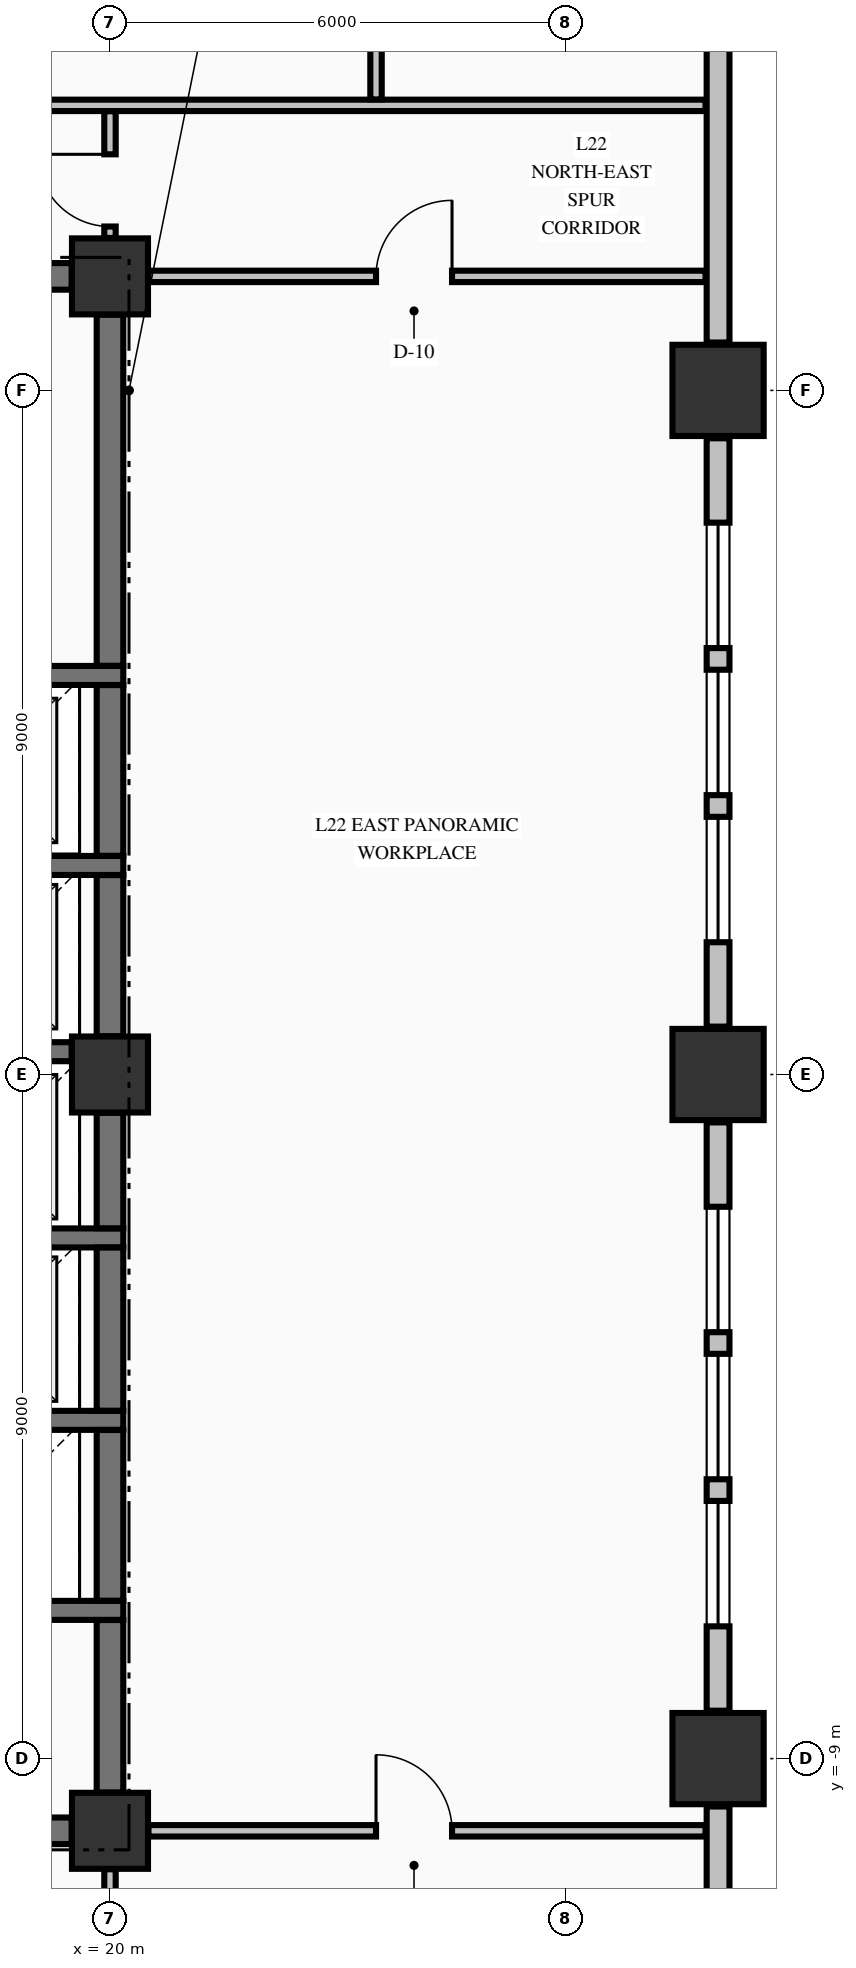
"""IFC4 building model, lengths in metres.
Left out: names, types, materials, properties, quantities, classifications, styles, units other than length and angle.
Written with IfcOpenShell. Run it as: python <this file> out.ifc"""

import sys

from ifc_helpers import new_model, si_unit, direction, frame, frame_2d, origin, origin_2d, place, context, subcontext, project, spatial, rectangle, extrude, element, fill, save


model = new_model("IFC4")
c1 = context("Model", 3, precision=1e-05, world=origin(), true_north=direction((0.0, 1.0)))
c2 = subcontext(c1, "Body", "Model", "MODEL_VIEW")
j1 = project(units=[si_unit("LENGTHUNIT", "METRE"), si_unit("PLANEANGLEUNIT", "RADIAN")], contexts=[c1])
p1 = place(None, origin())
s1 = spatial("IfcSite", under=j1, at=p1, CompositionType="ELEMENT")
p2 = place(p1, origin())
s2 = spatial("IfcBuilding", under=s1, at=p2, CompositionType="ELEMENT")
p3 = place(p2, frame((0.0, 0.0, 91.36)))
s3 = spatial("IfcBuildingStorey", under=s2, at=p3, CompositionType="ELEMENT", Elevation=91.36)
for number, where, z_axis, x_axis in (
    (1, (28.0, -9.0, -0.25), (0.0, 0.0, 1.0), (1.0, 0.0, 0.0)),
    (2, (28.0, 0.0, -0.25), (0.0, 0.0, 1.0), (1.0, 0.0, 0.0)),
    (3, (28.0, 9.0, -0.25), (0.0, 0.0, 1.0), (1.0, 0.0, 0.0)),
):
    element("IfcColumn", number, at=place(p3, frame(where, z_axis=z_axis, x_axis=x_axis)), inside=s3, PredefinedType="COLUMN", context=c2, shape_type="SweptSolid", body=[
        extrude(rectangle(XDim=1.2, YDim=1.2, at=origin_2d()), origin(), (0.0, 0.0, 1.0), 3.57),
    ])
for number, where, z_axis, x_axis in (
    (4, (20.0, -9.95, -0.25), (0.0, 0.0, 1.0), (1.0, 0.0, 0.0)),
    (5, (20.0, 10.5, -0.25), (0.0, 0.0, 1.0), (1.0, 0.0, 0.0)),
    (6, (20.0, 0.0, -0.25), (0.0, 0.0, 1.0), (1.0, 0.0, 0.0)),
):
    element("IfcColumn", number, at=place(p3, frame(where, z_axis=z_axis, x_axis=x_axis)), inside=s3, PredefinedType="COLUMN", context=c2, shape_type="SweptSolid", body=[
        extrude(rectangle(XDim=1.0, YDim=1.0, at=origin_2d()), origin(), (0.0, 0.0, 1.0), 3.57),
    ])
p4 = place(p3, frame((28.0, -20.37, 0.0), z_axis=(0.0, 0.0, 1.0), x_axis=(0.0, 1.0, 0.0)))
e7 = element("IfcWall", 7, at=p4, inside=s3, PredefinedType="STANDARD", context=c2, shape_type="SweptSolid", body=[
    extrude(rectangle(XDim=10.74, YDim=0.3, at=frame_2d((5.37, 0.0))), origin(), (0.0, 0.0, 1.0), 2.712),
])
p5 = place(p3, frame((28.0, -8.37, 0.0), z_axis=(0.0, 0.0, 1.0), x_axis=(0.0, 1.0, 0.0)))
e8 = element("IfcWall", 8, at=p5, inside=s3, PredefinedType="STANDARD", context=c2, shape_type="SweptSolid", body=[
    extrude(rectangle(XDim=7.74, YDim=0.3, at=frame_2d((3.87, 0.0))), origin(), (0.0, 0.0, 1.0), 2.712),
])
p6 = place(p5, frame((1.11, 0.0, 0.8)))
e9 = element("IfcOpeningElement", 9, at=p6, cuts=e8, PredefinedType="OPENING", context=c2, shape_type="SweptSolid", body=[
    extrude(rectangle(XDim=1.65, YDim=1.7, at=frame_2d((0.825, 0.85))), frame((0.0, 0.16, 0.0), z_axis=(0.0, -1.0, 0.0), x_axis=(1.0, 0.0, 0.0)), (0.0, 0.0, 1.0), 0.32),
])
p7 = place(p5, frame((3.045, 0.0, 0.8)))
e10 = element("IfcOpeningElement", 10, at=p7, cuts=e8, PredefinedType="OPENING", context=c2, shape_type="SweptSolid", body=[
    extrude(rectangle(XDim=1.65, YDim=1.7, at=frame_2d((0.825, 0.85))), frame((0.0, 0.16, 0.0), z_axis=(0.0, -1.0, 0.0), x_axis=(1.0, 0.0, 0.0)), (0.0, 0.0, 1.0), 0.32),
])
p8 = place(p5, frame((4.98, 0.0, 0.8)))
e11 = element("IfcOpeningElement", 11, at=p8, cuts=e8, PredefinedType="OPENING", context=c2, shape_type="SweptSolid", body=[
    extrude(rectangle(XDim=1.65, YDim=1.7, at=frame_2d((0.825, 0.85))), frame((0.0, 0.16, 0.0), z_axis=(0.0, -1.0, 0.0), x_axis=(1.0, 0.0, 0.0)), (0.0, 0.0, 1.0), 0.32),
])
p9 = place(p3, frame((28.0, 0.63, 0.0), z_axis=(0.0, 0.0, 1.0), x_axis=(0.0, 1.0, 0.0)))
e12 = element("IfcWall", 12, at=p9, inside=s3, PredefinedType="STANDARD", context=c2, shape_type="SweptSolid", body=[
    extrude(rectangle(XDim=7.74, YDim=0.3, at=frame_2d((3.87, 0.0))), origin(), (0.0, 0.0, 1.0), 2.712),
])
p10 = place(p9, frame((1.11, 0.0, 0.8)))
e13 = element("IfcOpeningElement", 13, at=p10, cuts=e12, PredefinedType="OPENING", context=c2, shape_type="SweptSolid", body=[
    extrude(rectangle(XDim=1.65, YDim=1.7, at=frame_2d((0.825, 0.85))), frame((0.0, 0.16, 0.0), z_axis=(0.0, -1.0, 0.0), x_axis=(1.0, 0.0, 0.0)), (0.0, 0.0, 1.0), 0.32),
])
p11 = place(p9, frame((3.045, 0.0, 0.8)))
e14 = element("IfcOpeningElement", 14, at=p11, cuts=e12, PredefinedType="OPENING", context=c2, shape_type="SweptSolid", body=[
    extrude(rectangle(XDim=1.65, YDim=1.7, at=frame_2d((0.825, 0.85))), frame((0.0, 0.16, 0.0), z_axis=(0.0, -1.0, 0.0), x_axis=(1.0, 0.0, 0.0)), (0.0, 0.0, 1.0), 0.32),
])
p12 = place(p9, frame((4.98, 0.0, 0.8)))
e15 = element("IfcOpeningElement", 15, at=p12, cuts=e12, PredefinedType="OPENING", context=c2, shape_type="SweptSolid", body=[
    extrude(rectangle(XDim=1.65, YDim=1.7, at=frame_2d((0.825, 0.85))), frame((0.0, 0.16, 0.0), z_axis=(0.0, -1.0, 0.0), x_axis=(1.0, 0.0, 0.0)), (0.0, 0.0, 1.0), 0.32),
])
p13 = place(p3, frame((28.0, 9.63, 0.0), z_axis=(0.0, 0.0, 1.0), x_axis=(0.0, 1.0, 0.0)))
e16 = element("IfcWall", 16, at=p13, inside=s3, PredefinedType="STANDARD", context=c2, shape_type="SweptSolid", body=[
    extrude(rectangle(XDim=10.74, YDim=0.3, at=frame_2d((5.37, 0.0))), origin(), (0.0, 0.0, 1.0), 2.712),
])
p14 = place(p3, frame((14.7, -9.95, 0.0), z_axis=(0.0, 0.0, 1.0), x_axis=(1.0, 0.0, 0.0)))
e17 = element("IfcWall", 17, at=p14, inside=s3, PredefinedType="SHEAR", context=c2, shape_type="SweptSolid", body=[
    extrude(rectangle(XDim=4.796, YDim=0.35, at=frame_2d((2.398, 0.0))), origin(), (0.0, 0.0, 1.0), 3.32),
])
p15 = place(p14, frame((0.65, 0.0, 0.0)))
e18 = element("IfcOpeningElement", 18, at=p15, cuts=e17, PredefinedType="OPENING", context=c2, shape_type="SweptSolid", body=[
    extrude(rectangle(XDim=1.2, YDim=2.15, at=frame_2d((0.6, 1.075))), frame((0.0, 0.185, 0.0), z_axis=(0.0, -1.0, 0.0), x_axis=(1.0, 0.0, 0.0)), (0.0, 0.0, 1.0), 0.37),
])
for number, where, z_axis, x_axis in (
    (19, (17.025, -7.05, 0.0), (0.0, 0.0, 1.0), (1.0, 0.0, 0.0)),
    (20, (17.025, -4.55, 0.0), (0.0, 0.0, 1.0), (1.0, 0.0, 0.0)),
    (21, (17.025, -2.15, 0.0), (0.0, 0.0, 1.0), (1.0, 0.0, 0.0)),
):
    element("IfcWall", number, at=place(p3, frame(where, z_axis=z_axis, x_axis=x_axis)), inside=s3, PredefinedType="SOLIDWALL", context=c2, shape_type="SweptSolid", body=[
        extrude(rectangle(XDim=3.15, YDim=0.25, at=frame_2d((1.575, 0.0))), origin(), (0.0, 0.0, 1.0), 3.32),
    ])
p16 = place(p3, frame((17.025, 0.3, 0.0), z_axis=(0.0, 0.0, 1.0), x_axis=(1.0, 0.0, 0.0)))
e22 = element("IfcWall", 22, at=p16, inside=s3, PredefinedType="SOLIDWALL", context=c2, shape_type="SweptSolid", body=[
    extrude(rectangle(XDim=2.471, YDim=0.25, at=frame_2d((1.236, 0.0))), origin(), (0.0, 0.0, 1.0), 3.32),
])
for number, where, z_axis, x_axis in (
    (23, (17.025, 2.75, 0.0), (0.0, 0.0, 1.0), (1.0, 0.0, 0.0)),
    (24, (17.025, 5.25, 0.0), (0.0, 0.0, 1.0), (1.0, 0.0, 0.0)),
):
    element("IfcWall", number, at=place(p3, frame(where, z_axis=z_axis, x_axis=x_axis)), inside=s3, PredefinedType="SOLIDWALL", context=c2, shape_type="SweptSolid", body=[
        extrude(rectangle(XDim=3.15, YDim=0.25, at=frame_2d((1.575, 0.0))), origin(), (0.0, 0.0, 1.0), 3.32),
    ])
p17 = place(p3, frame((14.7, 10.5, 0.0), z_axis=(0.0, 0.0, 1.0), x_axis=(1.0, 0.0, 0.0)))
e25 = element("IfcWall", 25, at=p17, inside=s3, PredefinedType="SHEAR", context=c2, shape_type="SweptSolid", body=[
    extrude(rectangle(XDim=4.796, YDim=0.35, at=frame_2d((2.398, 0.0))), origin(), (0.0, 0.0, 1.0), 3.32),
])
p18 = place(p17, frame((0.65, 0.0, 0.0)))
e26 = element("IfcOpeningElement", 26, at=p18, cuts=e25, PredefinedType="OPENING", context=c2, shape_type="SweptSolid", body=[
    extrude(rectangle(XDim=1.2, YDim=2.15, at=frame_2d((0.6, 1.075))), frame((0.0, 0.185, 0.0), z_axis=(0.0, -1.0, 0.0), x_axis=(1.0, 0.0, 0.0)), (0.0, 0.0, 1.0), 0.37),
])
p19 = place(p17, frame((3.25, 0.0, 0.0)))
e27 = element("IfcOpeningElement", 27, at=p19, cuts=e25, PredefinedType="OPENING", context=c2, shape_type="SweptSolid", body=[
    extrude(rectangle(XDim=0.9, YDim=2.15, at=frame_2d((0.45, 1.075))), frame((0.0, 0.185, 0.0), z_axis=(0.0, -1.0, 0.0), x_axis=(1.0, 0.0, 0.0)), (0.0, 0.0, 1.0), 0.37),
])
p20 = place(p3, frame((20.506, -9.95, 0.0), z_axis=(0.0, 0.0, 1.0), x_axis=(1.0, 0.0, 0.0)))
e28 = element("IfcWall", 28, at=p20, inside=s3, PredefinedType="PARTITIONING", context=c2, shape_type="SweptSolid", body=[
    extrude(rectangle(XDim=7.329, YDim=0.15, at=frame_2d((3.665, 0.0))), origin(), (0.0, 0.0, 1.0), 3.32),
])
p21 = place(p20, frame((2.994, 0.0, 0.0)))
e29 = element("IfcOpeningElement", 29, at=p21, cuts=e28, PredefinedType="OPENING", context=c2, shape_type="SweptSolid", body=[
    extrude(rectangle(XDim=1.0, YDim=2.15, at=frame_2d((0.5, 1.075))), frame((0.0, 0.085, 0.0), z_axis=(0.0, -1.0, 0.0), x_axis=(1.0, 0.0, 0.0)), (0.0, 0.0, 1.0), 0.17),
])
p22 = place(p3, frame((20.506, 10.5, 0.0), z_axis=(0.0, 0.0, 1.0), x_axis=(1.0, 0.0, 0.0)))
e30 = element("IfcWall", 30, at=p22, inside=s3, PredefinedType="PARTITIONING", context=c2, shape_type="SweptSolid", body=[
    extrude(rectangle(XDim=7.329, YDim=0.15, at=frame_2d((3.665, 0.0))), origin(), (0.0, 0.0, 1.0), 3.32),
])
p23 = place(p22, frame((2.994, 0.0, 0.0)))
e31 = element("IfcOpeningElement", 31, at=p23, cuts=e30, PredefinedType="OPENING", context=c2, shape_type="SweptSolid", body=[
    extrude(rectangle(XDim=1.0, YDim=2.15, at=frame_2d((0.5, 1.075))), frame((0.0, 0.085, 0.0), z_axis=(0.0, -1.0, 0.0), x_axis=(1.0, 0.0, 0.0)), (0.0, 0.0, 1.0), 0.17),
])
p24 = place(p3, frame((-22.835, 12.75, 0.0), z_axis=(0.0, 0.0, 1.0), x_axis=(1.0, 0.0, 0.0)))
e32 = element("IfcWall", 32, at=p24, inside=s3, PredefinedType="PARTITIONING", context=c2, shape_type="SweptSolid", body=[
    extrude(rectangle(XDim=50.67, YDim=0.15, at=frame_2d((25.335, 0.0))), origin(), (0.0, 0.0, 1.0), 3.32),
])
p25 = place(p24, frame((14.61, 0.0, 0.0)))
e33 = element("IfcOpeningElement", 33, at=p25, cuts=e32, PredefinedType="OPENING", context=c2, shape_type="SweptSolid", body=[
    extrude(rectangle(XDim=1.05, YDim=2.15, at=frame_2d((0.525, 1.075))), frame((0.0, 0.085, 0.0), z_axis=(0.0, -1.0, 0.0), x_axis=(1.0, 0.0, 0.0)), (0.0, 0.0, 1.0), 0.17),
])
p26 = place(p24, frame((17.91, 0.0, 0.0)))
e34 = element("IfcOpeningElement", 34, at=p26, cuts=e32, PredefinedType="OPENING", context=c2, shape_type="SweptSolid", body=[
    extrude(rectangle(XDim=1.05, YDim=2.15, at=frame_2d((0.525, 1.075))), frame((0.0, 0.085, 0.0), z_axis=(0.0, -1.0, 0.0), x_axis=(1.0, 0.0, 0.0)), (0.0, 0.0, 1.0), 0.17),
])
p27 = place(p24, frame((35.79, 0.0, 0.0)))
e35 = element("IfcOpeningElement", 35, at=p27, cuts=e32, PredefinedType="OPENING", context=c2, shape_type="SweptSolid", body=[
    extrude(rectangle(XDim=1.05, YDim=2.15, at=frame_2d((0.525, 1.075))), frame((0.0, 0.085, 0.0), z_axis=(0.0, -1.0, 0.0), x_axis=(1.0, 0.0, 0.0)), (0.0, 0.0, 1.0), 0.17),
])
p28 = place(p3, frame((20.0, -9.446, 0.0), z_axis=(0.0, 0.0, 1.0), x_axis=(0.0, 1.0, 0.0)))
e36 = element("IfcWall", 36, at=p28, inside=s3, PredefinedType="SHEAR", context=c2, shape_type="SweptSolid", body=[
    extrude(rectangle(XDim=2.269, YDim=0.35, at=frame_2d((1.135, 0.0))), origin(), (0.0, 0.0, 1.0), 3.32),
])
p29 = place(p3, frame((20.0, -6.923, 0.0), z_axis=(0.0, 0.0, 1.0), x_axis=(0.0, 1.0, 0.0)))
e37 = element("IfcWall", 37, at=p29, inside=s3, PredefinedType="SHEAR", context=c2, shape_type="SweptSolid", body=[
    extrude(rectangle(XDim=2.246, YDim=0.35, at=frame_2d((1.123, 0.0))), origin(), (0.0, 0.0, 1.0), 3.32),
])
p30 = place(p3, frame((20.0, -4.423, 0.0), z_axis=(0.0, 0.0, 1.0), x_axis=(0.0, 1.0, 0.0)))
e38 = element("IfcWall", 38, at=p30, inside=s3, PredefinedType="SHEAR", context=c2, shape_type="SweptSolid", body=[
    extrude(rectangle(XDim=2.146, YDim=0.35, at=frame_2d((1.073, 0.0))), origin(), (0.0, 0.0, 1.0), 3.32),
])
p31 = place(p3, frame((20.0, -2.023, 0.0), z_axis=(0.0, 0.0, 1.0), x_axis=(0.0, 1.0, 0.0)))
e39 = element("IfcWall", 39, at=p31, inside=s3, PredefinedType="SHEAR", context=c2, shape_type="SweptSolid", body=[
    extrude(rectangle(XDim=1.519, YDim=0.35, at=frame_2d((0.76, 0.0))), origin(), (0.0, 0.0, 1.0), 3.32),
])
p32 = place(p3, frame((20.0, 0.504, 0.0), z_axis=(0.0, 0.0, 1.0), x_axis=(0.0, 1.0, 0.0)))
e40 = element("IfcWall", 40, at=p32, inside=s3, PredefinedType="SHEAR", context=c2, shape_type="SweptSolid", body=[
    extrude(rectangle(XDim=2.119, YDim=0.35, at=frame_2d((1.06, 0.0))), origin(), (0.0, 0.0, 1.0), 3.32),
])
p33 = place(p3, frame((20.0, 2.877, 0.0), z_axis=(0.0, 0.0, 1.0), x_axis=(0.0, 1.0, 0.0)))
e41 = element("IfcWall", 41, at=p33, inside=s3, PredefinedType="SHEAR", context=c2, shape_type="SweptSolid", body=[
    extrude(rectangle(XDim=2.246, YDim=0.35, at=frame_2d((1.123, 0.0))), origin(), (0.0, 0.0, 1.0), 3.32),
])
p34 = place(p3, frame((20.0, 5.377, 0.0), z_axis=(0.0, 0.0, 1.0), x_axis=(0.0, 1.0, 0.0)))
e42 = element("IfcWall", 42, at=p34, inside=s3, PredefinedType="SHEAR", context=c2, shape_type="SweptSolid", body=[
    extrude(rectangle(XDim=4.619, YDim=0.35, at=frame_2d((2.31, 0.0))), origin(), (0.0, 0.0, 1.0), 3.32),
])
p35 = place(p3, frame((20.0, -12.472, 0.0), z_axis=(0.0, 0.0, 1.0), x_axis=(0.0, 1.0, 0.0)))
e43 = element("IfcWall", 43, at=p35, inside=s3, PredefinedType="PARTITIONING", context=c2, shape_type="SweptSolid", body=[
    extrude(rectangle(XDim=2.016, YDim=0.15, at=frame_2d((1.008, 0.0))), origin(), (0.0, 0.0, 1.0), 2.81),
])
p36 = place(p35, frame((0.747, 0.0, 0.0)))
e44 = element("IfcOpeningElement", 44, at=p36, cuts=e43, PredefinedType="OPENING", context=c2, shape_type="SweptSolid", body=[
    extrude(rectangle(XDim=0.95, YDim=2.15, at=frame_2d((0.475, 1.075))), frame((0.0, 0.085, 0.0), z_axis=(0.0, -1.0, 0.0), x_axis=(1.0, 0.0, 0.0)), (0.0, 0.0, 1.0), 0.17),
])
p37 = place(p3, frame((20.0, 11.006, 0.0), z_axis=(0.0, 0.0, 1.0), x_axis=(0.0, 1.0, 0.0)))
e45 = element("IfcWall", 45, at=p37, inside=s3, PredefinedType="PARTITIONING", context=c2, shape_type="SweptSolid", body=[
    extrude(rectangle(XDim=1.666, YDim=0.15, at=frame_2d((0.833, 0.0))), origin(), (0.0, 0.0, 1.0), 2.81),
])
p38 = place(p37, frame((0.15, 0.0, 0.0)))
e46 = element("IfcOpeningElement", 46, at=p38, cuts=e45, PredefinedType="OPENING", context=c2, shape_type="SweptSolid", body=[
    extrude(rectangle(XDim=0.95, YDim=2.15, at=frame_2d((0.475, 1.075))), frame((0.0, 0.085, 0.0), z_axis=(0.0, -1.0, 0.0), x_axis=(1.0, 0.0, 0.0)), (0.0, 0.0, 1.0), 0.17),
])
p39 = place(p3, frame((23.5, 12.828, 0.0), z_axis=(0.0, 0.0, 1.0), x_axis=(0.0, 1.0, 0.0)))
e47 = element("IfcWall", 47, at=p39, inside=s3, PredefinedType="PARTITIONING", context=c2, shape_type="SweptSolid", body=[
    extrude(rectangle(XDim=7.566, YDim=0.15, at=frame_2d((3.783, 0.0))), origin(), (0.0, 0.0, 1.0), 3.32),
])
p40 = place(p6, origin())
e48 = element("IfcWindow", 48, at=p40, inside=s3, PartitioningType="SINGLE_PANEL", PredefinedType="WINDOW", context=c2, shape_type="SweptSolid", body=[
    extrude(rectangle(XDim=1.65, YDim=1.7, at=frame_2d((0.825, 0.85))), frame((0.0, 0.03, 0.0), z_axis=(0.0, -1.0, 0.0), x_axis=(1.0, 0.0, 0.0)), (0.0, 0.0, 1.0), 0.06),
])
fill(e9, e48)
p41 = place(p7, origin())
e49 = element("IfcWindow", 49, at=p41, inside=s3, PartitioningType="SINGLE_PANEL", PredefinedType="WINDOW", context=c2, shape_type="SweptSolid", body=[
    extrude(rectangle(XDim=1.65, YDim=1.7, at=frame_2d((0.825, 0.85))), frame((0.0, 0.03, 0.0), z_axis=(0.0, -1.0, 0.0), x_axis=(1.0, 0.0, 0.0)), (0.0, 0.0, 1.0), 0.06),
])
fill(e10, e49)
p42 = place(p8, origin())
e50 = element("IfcWindow", 50, at=p42, inside=s3, PartitioningType="SINGLE_PANEL", PredefinedType="WINDOW", context=c2, shape_type="SweptSolid", body=[
    extrude(rectangle(XDim=1.65, YDim=1.7, at=frame_2d((0.825, 0.85))), frame((0.0, 0.03, 0.0), z_axis=(0.0, -1.0, 0.0), x_axis=(1.0, 0.0, 0.0)), (0.0, 0.0, 1.0), 0.06),
])
fill(e11, e50)
p43 = place(p10, origin())
e51 = element("IfcWindow", 51, at=p43, inside=s3, PartitioningType="SINGLE_PANEL", PredefinedType="WINDOW", context=c2, shape_type="SweptSolid", body=[
    extrude(rectangle(XDim=1.65, YDim=1.7, at=frame_2d((0.825, 0.85))), frame((0.0, 0.03, 0.0), z_axis=(0.0, -1.0, 0.0), x_axis=(1.0, 0.0, 0.0)), (0.0, 0.0, 1.0), 0.06),
])
fill(e13, e51)
p44 = place(p11, origin())
e52 = element("IfcWindow", 52, at=p44, inside=s3, PartitioningType="SINGLE_PANEL", PredefinedType="WINDOW", context=c2, shape_type="SweptSolid", body=[
    extrude(rectangle(XDim=1.65, YDim=1.7, at=frame_2d((0.825, 0.85))), frame((0.0, 0.03, 0.0), z_axis=(0.0, -1.0, 0.0), x_axis=(1.0, 0.0, 0.0)), (0.0, 0.0, 1.0), 0.06),
])
fill(e14, e52)
p45 = place(p12, origin())
e53 = element("IfcWindow", 53, at=p45, inside=s3, PartitioningType="SINGLE_PANEL", PredefinedType="WINDOW", context=c2, shape_type="SweptSolid", body=[
    extrude(rectangle(XDim=1.65, YDim=1.7, at=frame_2d((0.825, 0.85))), frame((0.0, 0.03, 0.0), z_axis=(0.0, -1.0, 0.0), x_axis=(1.0, 0.0, 0.0)), (0.0, 0.0, 1.0), 0.06),
])
fill(e15, e53)
p46 = place(p38, origin())
e54 = element("IfcDoor", 54, at=p46, inside=s3, OperationType="SINGLE_SWING_RIGHT", PredefinedType="DOOR", context=c2, shape_type="SweptSolid", body=[
    extrude(rectangle(XDim=0.95, YDim=2.15, at=frame_2d((0.475, 1.075))), frame((0.0, 0.025, 0.0), z_axis=(0.0, -1.0, 0.0), x_axis=(1.0, 0.0, 0.0)), (0.0, 0.0, 1.0), 0.05),
])
fill(e46, e54)
p47 = place(p23, origin())
e55 = element("IfcDoor", 55, at=p47, inside=s3, OperationType="SINGLE_SWING_RIGHT", PredefinedType="DOOR", context=c2, shape_type="SweptSolid", body=[
    extrude(rectangle(XDim=1.0, YDim=2.15, at=frame_2d((0.5, 1.075))), frame((0.0, 0.025, 0.0), z_axis=(0.0, -1.0, 0.0), x_axis=(1.0, 0.0, 0.0)), (0.0, 0.0, 1.0), 0.05),
])
fill(e31, e55)
p48 = place(p21, origin())
e56 = element("IfcDoor", 56, at=p48, inside=s3, OperationType="SINGLE_SWING_LEFT", PredefinedType="DOOR", context=c2, shape_type="SweptSolid", body=[
    extrude(rectangle(XDim=1.0, YDim=2.15, at=frame_2d((0.5, 1.075))), frame((0.0, 0.025, 0.0), z_axis=(0.0, -1.0, 0.0), x_axis=(1.0, 0.0, 0.0)), (0.0, 0.0, 1.0), 0.05),
])
fill(e29, e56)
save(model, sys.argv[1])
